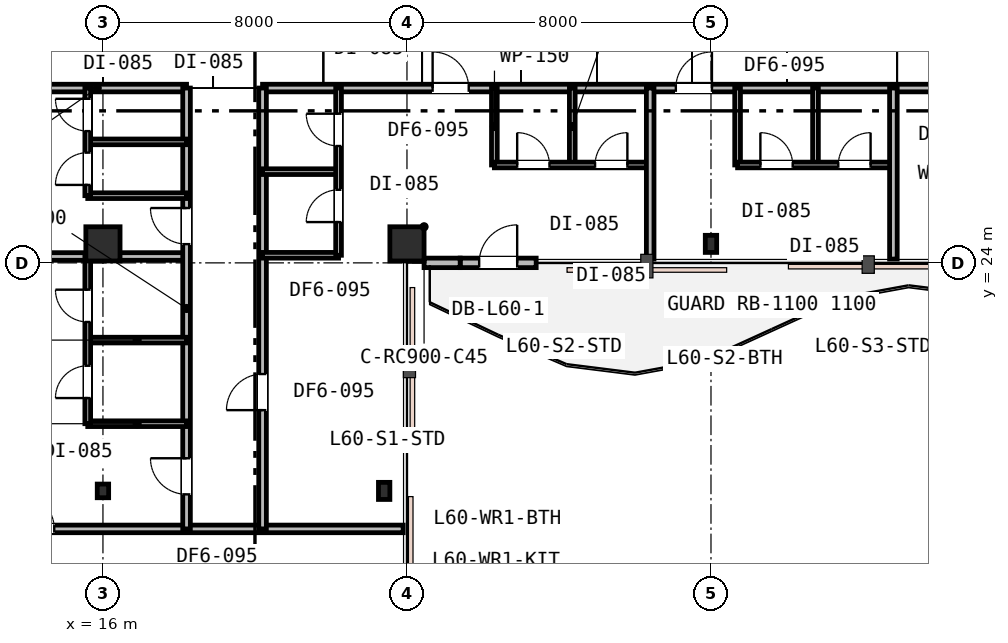
"""IFC4 building model, lengths in metres.
Left out: names, types, materials, properties, quantities, classifications, styles, units other than length and angle.
Written with IfcOpenShell. Run it as: python <this file> out.ifc"""

import sys

from ifc_helpers import new_model, si_unit, direction, frame, frame_2d, origin, origin_2d, place, context, subcontext, project, spatial, rectangle, i_section, extrude, element, fill, save


model = new_model("IFC4")
c1 = context("Model", 3, precision=1e-05, world=origin(), true_north=direction((0.0, 1.0)))
c2 = subcontext(c1, "Body", "Model", "MODEL_VIEW")
j1 = project(units=[si_unit("LENGTHUNIT", "METRE"), si_unit("PLANEANGLEUNIT", "RADIAN")], contexts=[c1])
p1 = place(None, origin())
s1 = spatial("IfcSite", under=j1, at=p1, CompositionType="ELEMENT")
p2 = place(p1, origin())
s2 = spatial("IfcBuilding", under=s1, at=p2, CompositionType="ELEMENT")
p3 = place(p2, frame((0.0, 0.0, 233.6)))
s3 = spatial("IfcBuildingStorey", under=s2, at=p3, CompositionType="ELEMENT", Elevation=233.6)
for number, where, z_axis, x_axis in (
    (1, (16.0, 24.5, 0.0), (0.0, 0.0, 1.0), (1.0, 0.0, 0.0)),
    (2, (24.0, 24.5, 0.0), (0.0, 0.0, 1.0), (1.0, 0.0, 0.0)),
):
    element("IfcColumn", number, at=place(p3, frame(where, z_axis=z_axis, x_axis=x_axis)), inside=s3, PredefinedType="COLUMN", context=c2, shape_type="SweptSolid", body=[
        extrude(rectangle(XDim=0.9, YDim=0.9, at=origin_2d()), origin(), (0.0, 0.0, 1.0), 3.8),
    ])
for number, where, z_axis, x_axis in (
    (3, (32.0, 24.5, 0.0), (0.0, 0.0, 1.0), (1.0, 0.0, 0.0)),
    (4, (23.4, 18.0, 0.0), (0.0, 0.0, 1.0), (1.0, 0.0, 0.0)),
):
    element("IfcColumn", number, at=place(p3, frame(where, z_axis=z_axis, x_axis=x_axis)), inside=s3, PredefinedType="COLUMN", context=c2, shape_type="SweptSolid", body=[
        extrude(i_section(OverallWidth=0.3, OverallDepth=0.45, WebThickness=0.014, FlangeThickness=0.026, FilletRadius=0.027, at=origin_2d()), origin(), (0.0, 0.0, 1.0), 3.8),
    ])
p4 = place(p3, frame((16.0, 18.0, 0.0), z_axis=(0.0, 0.0, 1.0), x_axis=(1.0, 0.0, 0.0)))
e5 = element("IfcColumn", 5, at=p4, inside=s3, PredefinedType="COLUMN", context=c2, shape_type="SweptSolid", body=[
    extrude(i_section(OverallWidth=0.3, OverallDepth=0.36, WebThickness=0.013, FlangeThickness=0.022, FilletRadius=0.027, at=origin_2d()), origin(), (0.0, 0.0, 1.0), 3.8),
])
p5 = place(p3, frame((25.4, 24.0, 0.0), z_axis=(0.0, 0.0, 1.0), x_axis=(1.0, 0.0, 0.0)))
e6 = element("IfcWall", 6, at=p5, inside=s3, PredefinedType="STANDARD", context=c2, shape_type="SweptSolid", body=[
    extrude(rectangle(XDim=2.0, YDim=0.25, at=frame_2d((1.0, 0.0))), origin(), (0.0, 0.0, 1.0), 3.24),
])
p6 = place(p5, frame((0.5, 0.0, 0.0)))
e7 = element("IfcOpeningElement", 7, at=p6, cuts=e6, PredefinedType="OPENING", context=c2, shape_type="SweptSolid", body=[
    extrude(rectangle(XDim=1.0, YDim=2.15, at=frame_2d((0.5, 1.075))), frame((0.0, 0.135, 0.0), z_axis=(0.0, -1.0, 0.0), x_axis=(1.0, 0.0, 0.0)), (0.0, 0.0, 1.0), 0.27),
])
p7 = place(p3, frame((24.45, 24.0, 0.0), z_axis=(0.0, 0.0, 1.0), x_axis=(1.0, 0.0, 0.0)))
e8 = element("IfcWall", 8, at=p7, inside=s3, PredefinedType="STANDARD", context=c2, shape_type="SweptSolid", body=[
    extrude(rectangle(XDim=0.95, YDim=0.25, at=frame_2d((0.475, 0.0))), origin(), (0.0, 0.0, 1.0), 3.24),
])
p8 = place(p3, frame((13.5, 28.6, 0.0), z_axis=(0.0, 0.0, 1.0), x_axis=(1.0, 0.0, 0.0)))
e9 = element("IfcWall", 9, at=p8, inside=s3, PredefinedType="PARTITIONING", context=c2, shape_type="SweptSolid", body=[
    extrude(rectangle(XDim=4.7, YDim=0.2, at=frame_2d((2.35, 0.0))), origin(), (0.0, 0.0, 1.0), 2.92),
])
p9 = place(p3, frame((20.2, 28.6, 0.0), z_axis=(0.0, 0.0, 1.0), x_axis=(1.0, 0.0, 0.0)))
e10 = element("IfcWall", 10, at=p9, inside=s3, PredefinedType="PARTITIONING", context=c2, shape_type="SweptSolid", body=[
    extrude(rectangle(XDim=25.7, YDim=0.2, at=frame_2d((12.85, 0.0))), origin(), (0.0, 0.0, 1.0), 2.92),
])
p10 = place(p9, frame((4.475, 0.0, 0.0)))
e11 = element("IfcOpeningElement", 11, at=p10, cuts=e10, PredefinedType="OPENING", context=c2, shape_type="SweptSolid", body=[
    extrude(rectangle(XDim=0.95, YDim=2.15, at=frame_2d((0.475, 1.075))), frame((0.0, 0.11, 0.0), z_axis=(0.0, -1.0, 0.0), x_axis=(1.0, 0.0, 0.0)), (0.0, 0.0, 1.0), 0.22),
])
p11 = place(p9, frame((10.875, 0.0, 0.0)))
e12 = element("IfcOpeningElement", 12, at=p11, cuts=e10, PredefinedType="OPENING", context=c2, shape_type="SweptSolid", body=[
    extrude(rectangle(XDim=0.95, YDim=2.15, at=frame_2d((0.475, 1.075))), frame((0.0, 0.11, 0.0), z_axis=(0.0, -1.0, 0.0), x_axis=(1.0, 0.0, 0.0)), (0.0, 0.0, 1.0), 0.22),
])
p12 = place(p9, frame((17.854, 0.0, 0.0)))
e13 = element("IfcOpeningElement", 13, at=p12, cuts=e10, PredefinedType="OPENING", context=c2, shape_type="SweptSolid", body=[
    extrude(rectangle(XDim=0.95, YDim=2.15, at=frame_2d((0.475, 1.075))), frame((0.0, 0.11, 0.0), z_axis=(0.0, -1.0, 0.0), x_axis=(1.0, 0.0, 0.0)), (0.0, 0.0, 1.0), 0.22),
])
p13 = place(p3, frame((26.3, 26.576, 0.0), z_axis=(0.0, 0.0, 1.0), x_axis=(0.0, 1.0, 0.0)))
e14 = element("IfcWall", 14, at=p13, inside=s3, PredefinedType="PARTITIONING", context=c2, shape_type="SweptSolid", body=[
    extrude(rectangle(XDim=2.024, YDim=0.15, at=frame_2d((1.012, 0.0))), origin(), (0.0, 0.0, 1.0), 3.22),
])
p14 = place(p3, frame((28.35, 26.576, 0.0), z_axis=(0.0, 0.0, 1.0), x_axis=(0.0, 1.0, 0.0)))
e15 = element("IfcWall", 15, at=p14, inside=s3, PredefinedType="PARTITIONING", context=c2, shape_type="SweptSolid", body=[
    extrude(rectangle(XDim=2.024, YDim=0.15, at=frame_2d((1.012, 0.0))), origin(), (0.0, 0.0, 1.0), 3.53),
])
p15 = place(p3, frame((26.3, 26.576, 0.0), z_axis=(0.0, 0.0, 1.0), x_axis=(1.0, 0.0, 0.0)))
e16 = element("IfcWall", 16, at=p15, inside=s3, PredefinedType="PARTITIONING", context=c2, shape_type="SweptSolid", body=[
    extrude(rectangle(XDim=4.1, YDim=0.15, at=frame_2d((2.05, 0.0))), origin(), (0.0, 0.0, 1.0), 3.22),
])
p16 = place(p15, frame((0.6, 0.0, 0.0)))
e17 = element("IfcOpeningElement", 17, at=p16, cuts=e16, PredefinedType="OPENING", context=c2, shape_type="SweptSolid", body=[
    extrude(rectangle(XDim=0.85, YDim=2.15, at=frame_2d((0.425, 1.075))), frame((0.0, 0.085, 0.0), z_axis=(0.0, -1.0, 0.0), x_axis=(1.0, 0.0, 0.0)), (0.0, 0.0, 1.0), 0.17),
])
p17 = place(p15, frame((2.65, 0.0, 0.0)))
e18 = element("IfcOpeningElement", 18, at=p17, cuts=e16, PredefinedType="OPENING", context=c2, shape_type="SweptSolid", body=[
    extrude(rectangle(XDim=0.85, YDim=2.15, at=frame_2d((0.425, 1.075))), frame((0.0, 0.085, 0.0), z_axis=(0.0, -1.0, 0.0), x_axis=(1.0, 0.0, 0.0)), (0.0, 0.0, 1.0), 0.17),
])
p18 = place(p3, frame((30.4, 24.1, 0.0), z_axis=(0.0, 0.0, 1.0), x_axis=(0.0, 1.0, 0.0)))
e19 = element("IfcWall", 19, at=p18, inside=s3, PredefinedType="PARTITIONING", context=c2, shape_type="SweptSolid", body=[
    extrude(rectangle(XDim=4.5, YDim=0.2, at=frame_2d((2.25, 0.0))), origin(), (0.0, 0.0, 1.0), 3.24),
])
p19 = place(p3, frame((32.7, 26.576, 0.0), z_axis=(0.0, 0.0, 1.0), x_axis=(0.0, 1.0, 0.0)))
e20 = element("IfcWall", 20, at=p19, inside=s3, PredefinedType="PARTITIONING", context=c2, shape_type="SweptSolid", body=[
    extrude(rectangle(XDim=2.024, YDim=0.15, at=frame_2d((1.012, 0.0))), origin(), (0.0, 0.0, 1.0), 3.53),
])
p20 = place(p3, frame((34.75, 26.576, 0.0), z_axis=(0.0, 0.0, 1.0), x_axis=(0.0, 1.0, 0.0)))
e21 = element("IfcWall", 21, at=p20, inside=s3, PredefinedType="PARTITIONING", context=c2, shape_type="SweptSolid", body=[
    extrude(rectangle(XDim=2.024, YDim=0.15, at=frame_2d((1.012, 0.0))), origin(), (0.0, 0.0, 1.0), 3.22),
])
p21 = place(p3, frame((32.7, 26.576, 0.0), z_axis=(0.0, 0.0, 1.0), x_axis=(1.0, 0.0, 0.0)))
e22 = element("IfcWall", 22, at=p21, inside=s3, PredefinedType="PARTITIONING", context=c2, shape_type="SweptSolid", body=[
    extrude(rectangle(XDim=4.1, YDim=0.15, at=frame_2d((2.05, 0.0))), origin(), (0.0, 0.0, 1.0), 3.22),
])
p22 = place(p21, frame((0.6, 0.0, 0.0)))
e23 = element("IfcOpeningElement", 23, at=p22, cuts=e22, PredefinedType="OPENING", context=c2, shape_type="SweptSolid", body=[
    extrude(rectangle(XDim=0.85, YDim=2.15, at=frame_2d((0.425, 1.075))), frame((0.0, 0.085, 0.0), z_axis=(0.0, -1.0, 0.0), x_axis=(1.0, 0.0, 0.0)), (0.0, 0.0, 1.0), 0.17),
])
p23 = place(p21, frame((2.65, 0.0, 0.0)))
e24 = element("IfcOpeningElement", 24, at=p23, cuts=e22, PredefinedType="OPENING", context=c2, shape_type="SweptSolid", body=[
    extrude(rectangle(XDim=0.85, YDim=2.15, at=frame_2d((0.425, 1.075))), frame((0.0, 0.085, 0.0), z_axis=(0.0, -1.0, 0.0), x_axis=(1.0, 0.0, 0.0)), (0.0, 0.0, 1.0), 0.17),
])
p24 = place(p3, frame((36.8, 24.1, 0.0), z_axis=(0.0, 0.0, 1.0), x_axis=(0.0, 1.0, 0.0)))
e25 = element("IfcWall", 25, at=p24, inside=s3, PredefinedType="PARTITIONING", context=c2, shape_type="SweptSolid", body=[
    extrude(rectangle(XDim=4.5, YDim=0.2, at=frame_2d((2.25, 0.0))), origin(), (0.0, 0.0, 1.0), 3.22),
])
p25 = place(p3, frame((5.1, 17.0, 0.0), z_axis=(0.0, 0.0, 1.0), x_axis=(1.0, 0.0, 0.0)))
e26 = element("IfcWall", 26, at=p25, inside=s3, PredefinedType="PARTITIONING", context=c2, shape_type="SweptSolid", body=[
    extrude(rectangle(XDim=18.8, YDim=0.2, at=frame_2d((9.4, 0.0))), origin(), (0.0, 0.0, 1.0), 2.92),
])
p26 = place(p25, frame((8.668, 0.0, 0.0)))
e27 = element("IfcOpeningElement", 27, at=p26, cuts=e26, PredefinedType="OPENING", context=c2, shape_type="SweptSolid", body=[
    extrude(rectangle(XDim=0.95, YDim=2.15, at=frame_2d((0.475, 1.075))), frame((0.0, 0.11, 0.0), z_axis=(0.0, -1.0, 0.0), x_axis=(1.0, 0.0, 0.0)), (0.0, 0.0, 1.0), 0.22),
])
p27 = place(p3, frame((5.1, 24.168, 0.0), z_axis=(0.0, 0.0, 1.0), x_axis=(1.0, 0.0, 0.0)))
e28 = element("IfcWall", 28, at=p27, inside=s3, PredefinedType="PARTITIONING", context=c2, shape_type="SweptSolid", body=[
    extrude(rectangle(XDim=13.1, YDim=0.2, at=frame_2d((6.55, 0.0))), origin(), (0.0, 0.0, 1.0), 2.92),
])
p28 = place(p3, frame((18.2, 17.0, 0.0), z_axis=(0.0, 0.0, 1.0), x_axis=(0.0, 1.0, 0.0)))
e29 = element("IfcWall", 29, at=p28, inside=s3, PredefinedType="PARTITIONING", context=c2, shape_type="SweptSolid", body=[
    extrude(rectangle(XDim=11.6, YDim=0.2, at=frame_2d((5.8, 0.0))), origin(), (0.0, 0.0, 1.0), 2.92),
])
p29 = place(p28, frame((7.493, 0.0, 0.0)))
e30 = element("IfcOpeningElement", 30, at=p29, cuts=e29, PredefinedType="OPENING", context=c2, shape_type="SweptSolid", body=[
    extrude(rectangle(XDim=0.95, YDim=2.15, at=frame_2d((0.475, 1.075))), frame((0.0, 0.11, 0.0), z_axis=(0.0, -1.0, 0.0), x_axis=(1.0, 0.0, 0.0)), (0.0, 0.0, 1.0), 0.22),
])
p30 = place(p28, frame((0.909, 0.0, 0.0)))
e31 = element("IfcOpeningElement", 31, at=p30, cuts=e29, PredefinedType="OPENING", context=c2, shape_type="SweptSolid", body=[
    extrude(rectangle(XDim=0.95, YDim=2.15, at=frame_2d((0.475, 1.075))), frame((0.0, 0.11, 0.0), z_axis=(0.0, -1.0, 0.0), x_axis=(1.0, 0.0, 0.0)), (0.0, 0.0, 1.0), 0.22),
])
for number, where, z_axis, x_axis in (
    (32, (15.6, 25.768, 0.0), (0.0, 0.0, 1.0), (1.0, 0.0, 0.0)),
    (33, (15.6, 27.184, 0.0), (0.0, 0.0, 1.0), (1.0, 0.0, 0.0)),
):
    element("IfcWall", number, at=place(p3, frame(where, z_axis=z_axis, x_axis=x_axis)), inside=s3, PredefinedType="PARTITIONING", context=c2, shape_type="SweptSolid", body=[
        extrude(rectangle(XDim=2.6, YDim=0.15, at=frame_2d((1.3, 0.0))), origin(), (0.0, 0.0, 1.0), 2.92),
    ])
p31 = place(p3, frame((15.6, 25.768, 0.0), z_axis=(0.0, 0.0, 1.0), x_axis=(0.0, 1.0, 0.0)))
e34 = element("IfcWall", 34, at=p31, inside=s3, PredefinedType="PARTITIONING", context=c2, shape_type="SweptSolid", body=[
    extrude(rectangle(XDim=2.832, YDim=0.15, at=frame_2d((1.416, 0.0))), origin(), (0.0, 0.0, 1.0), 2.92),
])
p32 = place(p31, frame((0.283, 0.0, 0.0)))
e35 = element("IfcOpeningElement", 35, at=p32, cuts=e34, PredefinedType="OPENING", context=c2, shape_type="SweptSolid", body=[
    extrude(rectangle(XDim=0.85, YDim=2.15, at=frame_2d((0.425, 1.075))), frame((0.0, 0.085, 0.0), z_axis=(0.0, -1.0, 0.0), x_axis=(1.0, 0.0, 0.0)), (0.0, 0.0, 1.0), 0.17),
])
p33 = place(p31, frame((1.699, 0.0, 0.0)))
e36 = element("IfcOpeningElement", 36, at=p33, cuts=e34, PredefinedType="OPENING", context=c2, shape_type="SweptSolid", body=[
    extrude(rectangle(XDim=0.85, YDim=2.15, at=frame_2d((0.425, 1.075))), frame((0.0, 0.085, 0.0), z_axis=(0.0, -1.0, 0.0), x_axis=(1.0, 0.0, 0.0)), (0.0, 0.0, 1.0), 0.17),
])
for number, where, z_axis, x_axis in (
    (37, (15.6, 19.768, 0.0), (0.0, 0.0, 1.0), (1.0, 0.0, 0.0)),
    (38, (15.6, 21.968, 0.0), (0.0, 0.0, 1.0), (1.0, 0.0, 0.0)),
):
    element("IfcWall", number, at=place(p3, frame(where, z_axis=z_axis, x_axis=x_axis)), inside=s3, PredefinedType="PARTITIONING", context=c2, shape_type="SweptSolid", body=[
        extrude(rectangle(XDim=2.6, YDim=0.15, at=frame_2d((1.3, 0.0))), origin(), (0.0, 0.0, 1.0), 2.92),
    ])
p34 = place(p3, frame((15.6, 19.768, 0.0), z_axis=(0.0, 0.0, 1.0), x_axis=(0.0, 1.0, 0.0)))
e39 = element("IfcWall", 39, at=p34, inside=s3, PredefinedType="PARTITIONING", context=c2, shape_type="SweptSolid", body=[
    extrude(rectangle(XDim=4.4, YDim=0.15, at=frame_2d((2.2, 0.0))), origin(), (0.0, 0.0, 1.0), 2.92),
])
p35 = place(p34, frame((0.675, 0.0, 0.0)))
e40 = element("IfcOpeningElement", 40, at=p35, cuts=e39, PredefinedType="OPENING", context=c2, shape_type="SweptSolid", body=[
    extrude(rectangle(XDim=0.85, YDim=2.15, at=frame_2d((0.425, 1.075))), frame((0.0, 0.085, 0.0), z_axis=(0.0, -1.0, 0.0), x_axis=(1.0, 0.0, 0.0)), (0.0, 0.0, 1.0), 0.17),
])
p36 = place(p34, frame((2.677, 0.0, 0.0)))
e41 = element("IfcOpeningElement", 41, at=p36, cuts=e39, PredefinedType="OPENING", context=c2, shape_type="SweptSolid", body=[
    extrude(rectangle(XDim=0.85, YDim=2.15, at=frame_2d((0.425, 1.075))), frame((0.0, 0.085, 0.0), z_axis=(0.0, -1.0, 0.0), x_axis=(1.0, 0.0, 0.0)), (0.0, 0.0, 1.0), 0.17),
])
p37 = place(p3, frame((20.2, 17.0, 0.0), z_axis=(0.0, 0.0, 1.0), x_axis=(0.0, 1.0, 0.0)))
e42 = element("IfcWall", 42, at=p37, inside=s3, PredefinedType="PARTITIONING", context=c2, shape_type="SweptSolid", body=[
    extrude(rectangle(XDim=11.6, YDim=0.2, at=frame_2d((5.8, 0.0))), origin(), (0.0, 0.0, 1.0), 2.92),
])
p38 = place(p37, frame((3.125, 0.0, 0.0)))
e43 = element("IfcOpeningElement", 43, at=p38, cuts=e42, PredefinedType="OPENING", context=c2, shape_type="SweptSolid", body=[
    extrude(rectangle(XDim=0.95, YDim=2.15, at=frame_2d((0.475, 1.075))), frame((0.0, 0.11, 0.0), z_axis=(0.0, -1.0, 0.0), x_axis=(1.0, 0.0, 0.0)), (0.0, 0.0, 1.0), 0.22),
])
p39 = place(p3, frame((20.2, 24.2, 0.0), z_axis=(0.0, 0.0, 1.0), x_axis=(1.0, 0.0, 0.0)))
e44 = element("IfcWall", 44, at=p39, inside=s3, PredefinedType="PARTITIONING", context=c2, shape_type="SweptSolid", body=[
    extrude(rectangle(XDim=2.0, YDim=0.15, at=frame_2d((1.0, 0.0))), origin(), (0.0, 0.0, 1.0), 2.92),
])
p40 = place(p3, frame((20.2, 26.4, 0.0), z_axis=(0.0, 0.0, 1.0), x_axis=(1.0, 0.0, 0.0)))
e45 = element("IfcWall", 45, at=p40, inside=s3, PredefinedType="PARTITIONING", context=c2, shape_type="SweptSolid", body=[
    extrude(rectangle(XDim=2.0, YDim=0.15, at=frame_2d((1.0, 0.0))), origin(), (0.0, 0.0, 1.0), 3.22),
])
p41 = place(p3, frame((22.2, 24.2, 0.0), z_axis=(0.0, 0.0, 1.0), x_axis=(0.0, 1.0, 0.0)))
e46 = element("IfcWall", 46, at=p41, inside=s3, PredefinedType="PARTITIONING", context=c2, shape_type="SweptSolid", body=[
    extrude(rectangle(XDim=4.4, YDim=0.15, at=frame_2d((2.2, 0.0))), origin(), (0.0, 0.0, 1.0), 2.92),
])
p42 = place(p41, frame((0.873, 0.0, 0.0)))
e47 = element("IfcOpeningElement", 47, at=p42, cuts=e46, PredefinedType="OPENING", context=c2, shape_type="SweptSolid", body=[
    extrude(rectangle(XDim=0.85, YDim=2.15, at=frame_2d((0.425, 1.075))), frame((0.0, 0.085, 0.0), z_axis=(0.0, -1.0, 0.0), x_axis=(1.0, 0.0, 0.0)), (0.0, 0.0, 1.0), 0.17),
])
p43 = place(p41, frame((2.875, 0.0, 0.0)))
e48 = element("IfcOpeningElement", 48, at=p43, cuts=e46, PredefinedType="OPENING", context=c2, shape_type="SweptSolid", body=[
    extrude(rectangle(XDim=0.85, YDim=2.15, at=frame_2d((0.425, 1.075))), frame((0.0, 0.085, 0.0), z_axis=(0.0, -1.0, 0.0), x_axis=(1.0, 0.0, 0.0)), (0.0, 0.0, 1.0), 0.17),
])
p44 = place(p6, origin())
e49 = element("IfcDoor", 49, at=p44, inside=s3, OperationType="SINGLE_SWING_RIGHT", PredefinedType="DOOR", context=c2, shape_type="SweptSolid", body=[
    extrude(rectangle(XDim=1.0, YDim=2.15, at=frame_2d((0.5, 1.075))), frame((0.0, 0.025, 0.0), z_axis=(0.0, -1.0, 0.0), x_axis=(1.0, 0.0, 0.0)), (0.0, 0.0, 1.0), 0.05),
])
fill(e7, e49)
p45 = place(p10, origin())
e50 = element("IfcDoor", 50, at=p45, inside=s3, OperationType="SINGLE_SWING_LEFT", PredefinedType="DOOR", context=c2, shape_type="SweptSolid", body=[
    extrude(rectangle(XDim=0.95, YDim=2.15, at=frame_2d((0.475, 1.075))), frame((0.0, 0.025, 0.0), z_axis=(0.0, -1.0, 0.0), x_axis=(1.0, 0.0, 0.0)), (0.0, 0.0, 1.0), 0.05),
])
fill(e11, e50)
p46 = place(p16, origin())
e51 = element("IfcDoor", 51, at=p46, inside=s3, OperationType="SINGLE_SWING_LEFT", PredefinedType="DOOR", context=c2, shape_type="SweptSolid", body=[
    extrude(rectangle(XDim=0.85, YDim=2.15, at=frame_2d((0.425, 1.075))), frame((0.0, 0.025, 0.0), z_axis=(0.0, -1.0, 0.0), x_axis=(1.0, 0.0, 0.0)), (0.0, 0.0, 1.0), 0.05),
])
fill(e17, e51)
p47 = place(p17, origin())
e52 = element("IfcDoor", 52, at=p47, inside=s3, OperationType="SINGLE_SWING_RIGHT", PredefinedType="DOOR", context=c2, shape_type="SweptSolid", body=[
    extrude(rectangle(XDim=0.85, YDim=2.15, at=frame_2d((0.425, 1.075))), frame((0.0, 0.025, 0.0), z_axis=(0.0, -1.0, 0.0), x_axis=(1.0, 0.0, 0.0)), (0.0, 0.0, 1.0), 0.05),
])
fill(e18, e52)
p48 = place(p11, origin())
e53 = element("IfcDoor", 53, at=p48, inside=s3, OperationType="SINGLE_SWING_RIGHT", PredefinedType="DOOR", context=c2, shape_type="SweptSolid", body=[
    extrude(rectangle(XDim=0.95, YDim=2.15, at=frame_2d((0.475, 1.075))), frame((0.0, 0.025, 0.0), z_axis=(0.0, -1.0, 0.0), x_axis=(1.0, 0.0, 0.0)), (0.0, 0.0, 1.0), 0.05),
])
fill(e12, e53)
p49 = place(p22, origin())
e54 = element("IfcDoor", 54, at=p49, inside=s3, OperationType="SINGLE_SWING_LEFT", PredefinedType="DOOR", context=c2, shape_type="SweptSolid", body=[
    extrude(rectangle(XDim=0.85, YDim=2.15, at=frame_2d((0.425, 1.075))), frame((0.0, 0.025, 0.0), z_axis=(0.0, -1.0, 0.0), x_axis=(1.0, 0.0, 0.0)), (0.0, 0.0, 1.0), 0.05),
])
fill(e23, e54)
p50 = place(p23, origin())
e55 = element("IfcDoor", 55, at=p50, inside=s3, OperationType="SINGLE_SWING_RIGHT", PredefinedType="DOOR", context=c2, shape_type="SweptSolid", body=[
    extrude(rectangle(XDim=0.85, YDim=2.15, at=frame_2d((0.425, 1.075))), frame((0.0, 0.025, 0.0), z_axis=(0.0, -1.0, 0.0), x_axis=(1.0, 0.0, 0.0)), (0.0, 0.0, 1.0), 0.05),
])
fill(e24, e55)
p51 = place(p29, origin())
e56 = element("IfcDoor", 56, at=p51, inside=s3, OperationType="SINGLE_SWING_RIGHT", PredefinedType="DOOR", context=c2, shape_type="SweptSolid", body=[
    extrude(rectangle(XDim=0.95, YDim=2.15, at=frame_2d((0.475, 1.075))), frame((0.0, 0.025, 0.0), z_axis=(0.0, -1.0, 0.0), x_axis=(1.0, 0.0, 0.0)), (0.0, 0.0, 1.0), 0.05),
])
fill(e30, e56)
p52 = place(p32, origin())
e57 = element("IfcDoor", 57, at=p52, inside=s3, OperationType="SINGLE_SWING_LEFT", PredefinedType="DOOR", context=c2, shape_type="SweptSolid", body=[
    extrude(rectangle(XDim=0.85, YDim=2.15, at=frame_2d((0.425, 1.075))), frame((0.0, 0.025, 0.0), z_axis=(0.0, -1.0, 0.0), x_axis=(1.0, 0.0, 0.0)), (0.0, 0.0, 1.0), 0.05),
])
fill(e35, e57)
p53 = place(p33, origin())
e58 = element("IfcDoor", 58, at=p53, inside=s3, OperationType="SINGLE_SWING_RIGHT", PredefinedType="DOOR", context=c2, shape_type="SweptSolid", body=[
    extrude(rectangle(XDim=0.85, YDim=2.15, at=frame_2d((0.425, 1.075))), frame((0.0, 0.025, 0.0), z_axis=(0.0, -1.0, 0.0), x_axis=(1.0, 0.0, 0.0)), (0.0, 0.0, 1.0), 0.05),
])
fill(e36, e58)
p54 = place(p30, origin())
e59 = element("IfcDoor", 59, at=p54, inside=s3, OperationType="SINGLE_SWING_RIGHT", PredefinedType="DOOR", context=c2, shape_type="SweptSolid", body=[
    extrude(rectangle(XDim=0.95, YDim=2.15, at=frame_2d((0.475, 1.075))), frame((0.0, 0.025, 0.0), z_axis=(0.0, -1.0, 0.0), x_axis=(1.0, 0.0, 0.0)), (0.0, 0.0, 1.0), 0.05),
])
fill(e31, e59)
p55 = place(p35, origin())
e60 = element("IfcDoor", 60, at=p55, inside=s3, OperationType="SINGLE_SWING_LEFT", PredefinedType="DOOR", context=c2, shape_type="SweptSolid", body=[
    extrude(rectangle(XDim=0.85, YDim=2.15, at=frame_2d((0.425, 1.075))), frame((0.0, 0.025, 0.0), z_axis=(0.0, -1.0, 0.0), x_axis=(1.0, 0.0, 0.0)), (0.0, 0.0, 1.0), 0.05),
])
fill(e40, e60)
p56 = place(p36, origin())
e61 = element("IfcDoor", 61, at=p56, inside=s3, OperationType="SINGLE_SWING_RIGHT", PredefinedType="DOOR", context=c2, shape_type="SweptSolid", body=[
    extrude(rectangle(XDim=0.85, YDim=2.15, at=frame_2d((0.425, 1.075))), frame((0.0, 0.025, 0.0), z_axis=(0.0, -1.0, 0.0), x_axis=(1.0, 0.0, 0.0)), (0.0, 0.0, 1.0), 0.05),
])
fill(e41, e61)
p57 = place(p38, origin())
e62 = element("IfcDoor", 62, at=p57, inside=s3, OperationType="SINGLE_SWING_LEFT", PredefinedType="DOOR", context=c2, shape_type="SweptSolid", body=[
    extrude(rectangle(XDim=0.95, YDim=2.15, at=frame_2d((0.475, 1.075))), frame((0.0, 0.025, 0.0), z_axis=(0.0, -1.0, 0.0), x_axis=(1.0, 0.0, 0.0)), (0.0, 0.0, 1.0), 0.05),
])
fill(e43, e62)
p58 = place(p42, origin())
e63 = element("IfcDoor", 63, at=p58, inside=s3, OperationType="SINGLE_SWING_LEFT", PredefinedType="DOOR", context=c2, shape_type="SweptSolid", body=[
    extrude(rectangle(XDim=0.85, YDim=2.15, at=frame_2d((0.425, 1.075))), frame((0.0, 0.025, 0.0), z_axis=(0.0, -1.0, 0.0), x_axis=(1.0, 0.0, 0.0)), (0.0, 0.0, 1.0), 0.05),
])
fill(e47, e63)
p59 = place(p43, origin())
e64 = element("IfcDoor", 64, at=p59, inside=s3, OperationType="SINGLE_SWING_RIGHT", PredefinedType="DOOR", context=c2, shape_type="SweptSolid", body=[
    extrude(rectangle(XDim=0.85, YDim=2.15, at=frame_2d((0.425, 1.075))), frame((0.0, 0.025, 0.0), z_axis=(0.0, -1.0, 0.0), x_axis=(1.0, 0.0, 0.0)), (0.0, 0.0, 1.0), 0.05),
])
fill(e48, e64)
p60 = place(p26, origin())
e65 = element("IfcDoor", 65, at=p60, inside=s3, OperationType="SINGLE_SWING_LEFT", PredefinedType="DOOR", context=c2, shape_type="SweptSolid", body=[
    extrude(rectangle(XDim=0.95, YDim=2.15, at=frame_2d((0.475, 1.075))), frame((0.0, 0.025, 0.0), z_axis=(0.0, -1.0, 0.0), x_axis=(1.0, 0.0, 0.0)), (0.0, 0.0, 1.0), 0.05),
])
fill(e27, e65)
save(model, sys.argv[1])
